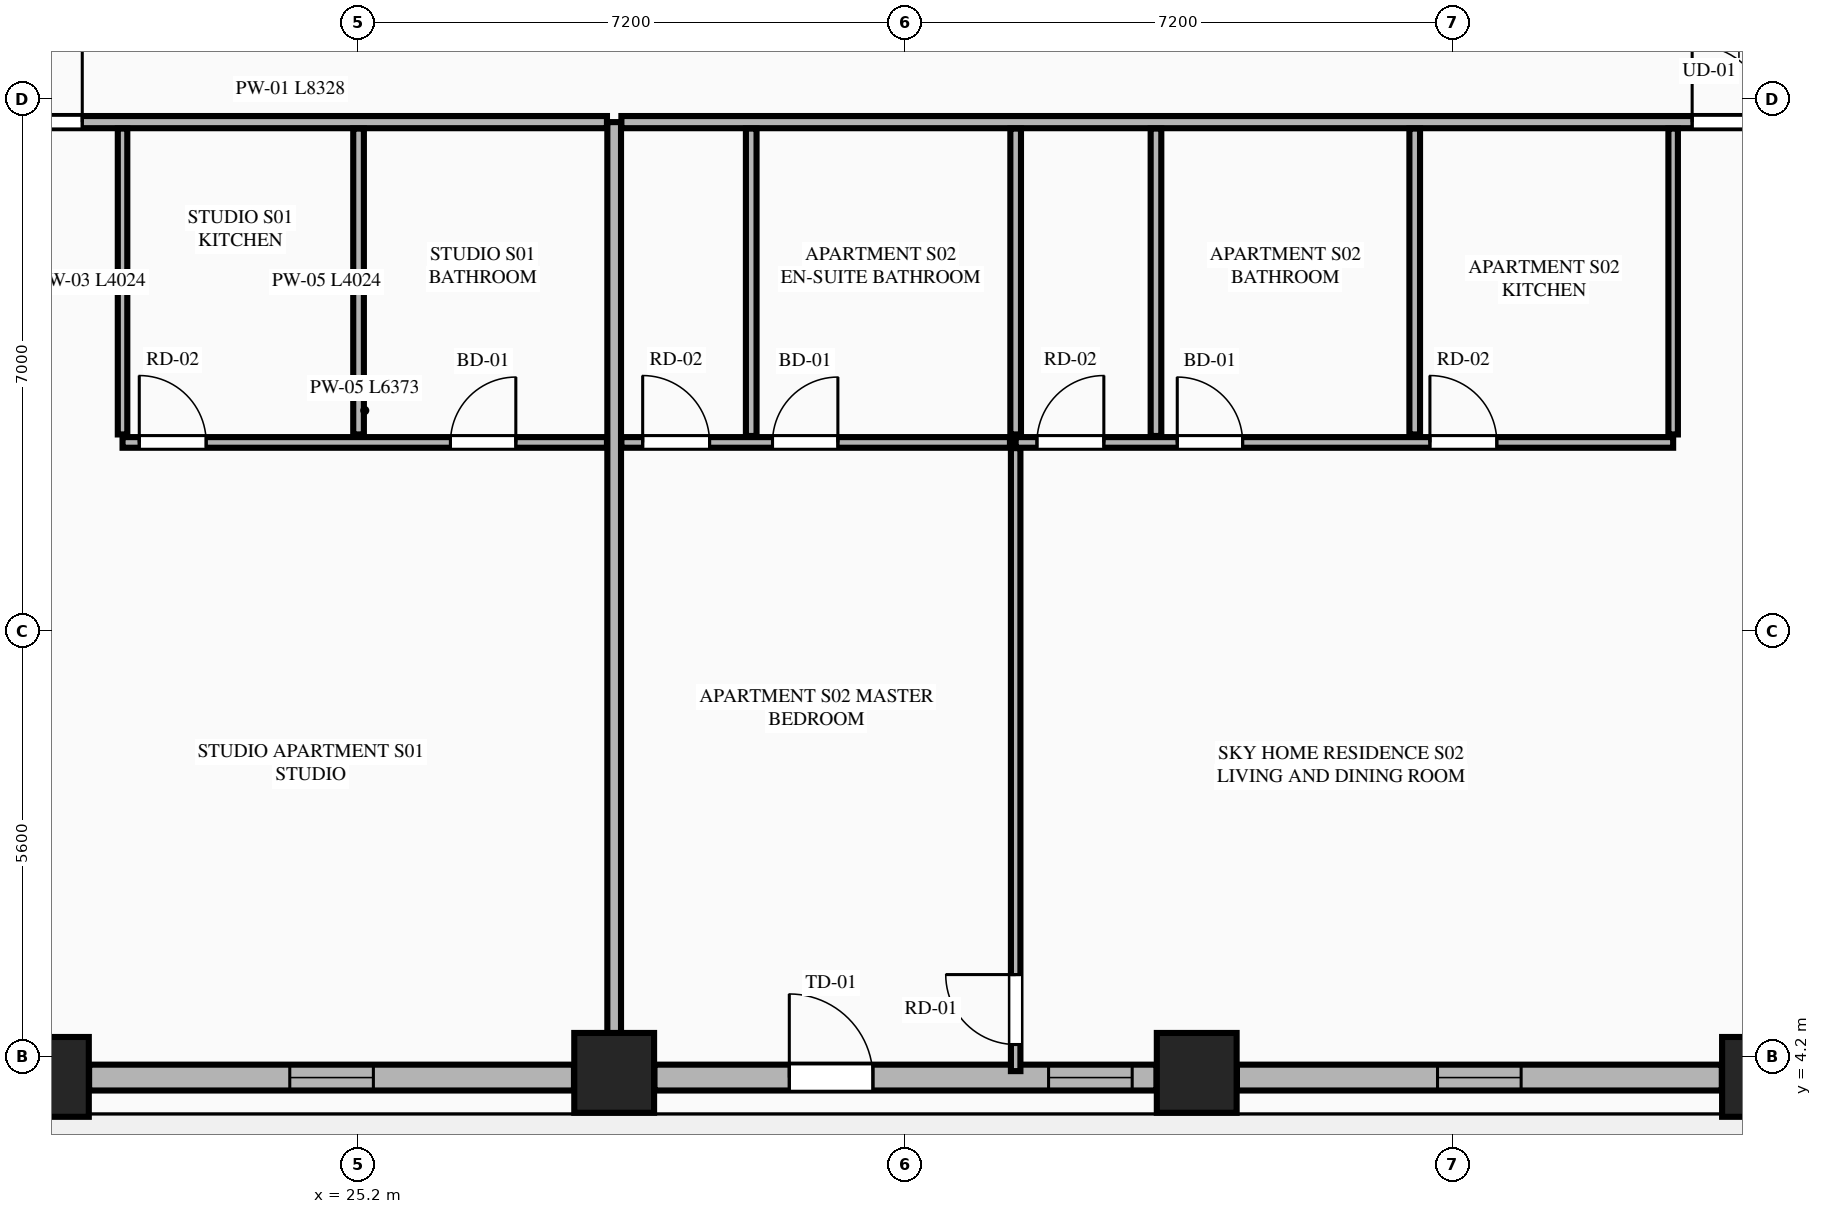
"""IFC4 building model, lengths in metres.
Left out: names, types, materials, properties, quantities, classifications, styles, units other than length and angle.
Written with IfcOpenShell. Run it as: python <this file> out.ifc"""

import sys

from ifc_helpers import new_model, si_unit, direction, frame, frame_2d, origin, origin_2d, place, context, subcontext, project, spatial, rectangle, extrude, element, fill, save


model = new_model("IFC4")
c1 = context("Model", 3, precision=1e-05, world=origin(), true_north=direction((0.0, 1.0)))
c2 = subcontext(c1, "Body", "Model", "MODEL_VIEW")
j1 = project(units=[si_unit("LENGTHUNIT", "METRE"), si_unit("PLANEANGLEUNIT", "RADIAN")], contexts=[c1])
p1 = place(None, origin())
s1 = spatial("IfcSite", under=j1, at=p1, CompositionType="ELEMENT")
p2 = place(p1, origin())
s2 = spatial("IfcBuilding", under=s1, at=p2, CompositionType="ELEMENT")
p3 = place(p2, frame((0.0, 0.0, 112.6)))
s3 = spatial("IfcBuildingStorey", under=s2, at=p3, CompositionType="ELEMENT", Elevation=112.6)
for number, where, z_axis, x_axis in (
    (1, (21.131, 3.939, 0.0), (0.0, 0.0, 1.0), (1.0, 0.0, 0.0)),
    (2, (28.568, 3.992, 0.0), (0.0, 0.0, 1.0), (1.0, 0.0, 0.0)),
    (3, (36.232, 3.992, 0.0), (0.0, 0.0, 1.0), (1.0, 0.0, 0.0)),
    (4, (43.669, 3.939, 0.0), (0.0, 0.0, 1.0), (1.0, 0.0, 0.0)),
):
    element("IfcColumn", number, at=place(p3, frame(where, z_axis=z_axis, x_axis=x_axis)), inside=s3, PredefinedType="COLUMN", context=c2, shape_type="SweptSolid", body=[
        extrude(rectangle(XDim=1.05, YDim=1.05, at=origin_2d()), origin(), (0.0, 0.0, 1.0), 3.55),
    ])
p4 = place(p3, frame((21.66, 3.93, 0.0), z_axis=(0.0, 0.0, 1.0), x_axis=(1.0, 0.0, 0.0)))
e5 = element("IfcWall", 5, at=p4, inside=s3, PredefinedType="STANDARD", context=c2, shape_type="SweptSolid", body=[
    extrude(rectangle(XDim=6.379, YDim=0.34, at=frame_2d((3.189, 0.0))), origin(), (0.0, 0.0, 1.0), 2.797),
])
p5 = place(p4, frame((2.64, 0.0, 0.75)))
e6 = element("IfcOpeningElement", 6, at=p5, cuts=e5, PredefinedType="OPENING", context=c2, shape_type="SweptSolid", body=[
    extrude(rectangle(XDim=1.1, YDim=1.897, at=frame_2d((0.55, 0.948))), frame((0.0, 0.18, 0.0), z_axis=(0.0, -1.0, 0.0), x_axis=(1.0, 0.0, 0.0)), (0.0, 0.0, 1.0), 0.36),
])
p6 = place(p3, frame((29.097, 3.93, 0.0), z_axis=(0.0, 0.0, 1.0), x_axis=(1.0, 0.0, 0.0)))
e7 = element("IfcWall", 7, at=p6, inside=s3, PredefinedType="STANDARD", context=c2, shape_type="SweptSolid", body=[
    extrude(rectangle(XDim=6.606, YDim=0.34, at=frame_2d((3.303, 0.0))), origin(), (0.0, 0.0, 1.0), 2.797),
])
p7 = place(p6, frame((1.775, 0.0, 0.0)))
e8 = element("IfcOpeningElement", 8, at=p7, cuts=e7, PredefinedType="OPENING", context=c2, shape_type="SweptSolid", body=[
    extrude(rectangle(XDim=1.1, YDim=2.25, at=frame_2d((0.55, 1.125))), frame((0.0, 0.18, 0.0), z_axis=(0.0, -1.0, 0.0), x_axis=(1.0, 0.0, 0.0)), (0.0, 0.0, 1.0), 0.36),
])
p8 = place(p6, frame((5.186, 0.0, 0.75)))
e9 = element("IfcOpeningElement", 9, at=p8, cuts=e7, PredefinedType="OPENING", context=c2, shape_type="SweptSolid", body=[
    extrude(rectangle(XDim=1.1, YDim=1.897, at=frame_2d((0.55, 0.948))), frame((0.0, 0.18, 0.0), z_axis=(0.0, -1.0, 0.0), x_axis=(1.0, 0.0, 0.0)), (0.0, 0.0, 1.0), 0.36),
])
p9 = place(p3, frame((36.761, 3.93, 0.0), z_axis=(0.0, 0.0, 1.0), x_axis=(1.0, 0.0, 0.0)))
e10 = element("IfcWall", 10, at=p9, inside=s3, PredefinedType="STANDARD", context=c2, shape_type="SweptSolid", body=[
    extrude(rectangle(XDim=6.379, YDim=0.34, at=frame_2d((3.189, 0.0))), origin(), (0.0, 0.0, 1.0), 2.797),
])
p10 = place(p9, frame((2.639, 0.0, 0.75)))
e11 = element("IfcOpeningElement", 11, at=p10, cuts=e10, PredefinedType="OPENING", context=c2, shape_type="SweptSolid", body=[
    extrude(rectangle(XDim=1.1, YDim=1.897, at=frame_2d((0.55, 0.948))), frame((0.0, 0.18, 0.0), z_axis=(0.0, -1.0, 0.0), x_axis=(1.0, 0.0, 0.0)), (0.0, 0.0, 1.0), 0.36),
])
p11 = place(p3, frame((28.568, 4.105, 0.0), z_axis=(0.0, 0.0, 1.0), x_axis=(0.0, 1.0, 0.0)))
e12 = element("IfcWall", 12, at=p11, inside=s3, PredefinedType="PARTITIONING", context=c2, shape_type="SweptSolid", body=[
    extrude(rectangle(XDim=12.395, YDim=0.18, at=frame_2d((6.198, 0.0))), origin(), (0.0, 0.0, 1.0), 2.722),
])
p12 = place(p3, frame((20.145, 16.5, 0.0), z_axis=(0.0, 0.0, 1.0), x_axis=(1.0, 0.0, 0.0)))
e13 = element("IfcWall", 13, at=p12, inside=s3, PredefinedType="PARTITIONING", context=c2, shape_type="SweptSolid", body=[
    extrude(rectangle(XDim=8.328, YDim=0.16, at=frame_2d((4.164, 0.0))), origin(), (0.0, 0.0, 1.0), 3.34),
])
p13 = place(p12, frame((0.405, 0.0, 0.0)))
e14 = element("IfcOpeningElement", 14, at=p13, cuts=e13, PredefinedType="OPENING", context=c2, shape_type="SweptSolid", body=[
    extrude(rectangle(XDim=1.02, YDim=2.25, at=frame_2d((0.51, 1.125))), frame((0.0, 0.09, 0.0), z_axis=(0.0, -1.0, 0.0), x_axis=(1.0, 0.0, 0.0)), (0.0, 0.0, 1.0), 0.18),
])
p14 = place(p3, frame((22.1, 12.391, 0.0), z_axis=(0.0, 0.0, 1.0), x_axis=(0.0, 1.0, 0.0)))
e15 = element("IfcWall", 15, at=p14, inside=s3, PredefinedType="PARTITIONING", context=c2, shape_type="SweptSolid", body=[
    extrude(rectangle(XDim=4.024, YDim=0.125, at=frame_2d((2.012, 0.0))), origin(), (0.0, 0.0, 1.0), 2.722),
])
p15 = place(p3, frame((22.1, 12.286, 0.0), z_axis=(0.0, 0.0, 1.0), x_axis=(1.0, 0.0, 0.0)))
e16 = element("IfcWall", 16, at=p15, inside=s3, PredefinedType="PLUMBINGWALL", context=c2, shape_type="SweptSolid", body=[
    extrude(rectangle(XDim=6.373, YDim=0.14, at=frame_2d((3.187, 0.0))), origin(), (0.0, 0.0, 1.0), 3.34),
])
p16 = place(p15, frame((4.314, 0.0, 0.0)))
e17 = element("IfcOpeningElement", 17, at=p16, cuts=e16, PredefinedType="OPENING", context=c2, shape_type="SweptSolid", body=[
    extrude(rectangle(XDim=0.86, YDim=2.1, at=frame_2d((0.43, 1.05))), frame((0.0, 0.08, 0.0), z_axis=(0.0, -1.0, 0.0), x_axis=(1.0, 0.0, 0.0)), (0.0, 0.0, 1.0), 0.16),
])
p17 = place(p15, frame((0.22, 0.0, 0.0)))
e18 = element("IfcOpeningElement", 18, at=p17, cuts=e16, PredefinedType="OPENING", context=c2, shape_type="SweptSolid", body=[
    extrude(rectangle(XDim=0.88, YDim=2.15, at=frame_2d((0.44, 1.075))), frame((0.0, 0.08, 0.0), z_axis=(0.0, -1.0, 0.0), x_axis=(1.0, 0.0, 0.0)), (0.0, 0.0, 1.0), 0.16),
])
p18 = place(p3, frame((25.205, 12.391, 0.0), z_axis=(0.0, 0.0, 1.0), x_axis=(0.0, 1.0, 0.0)))
e19 = element("IfcWall", 19, at=p18, inside=s3, PredefinedType="PLUMBINGWALL", context=c2, shape_type="SweptSolid", body=[
    extrude(rectangle(XDim=4.024, YDim=0.14, at=frame_2d((2.012, 0.0))), origin(), (0.0, 0.0, 1.0), 3.34),
])
p19 = place(p3, frame((28.663, 16.5, 0.0), z_axis=(0.0, 0.0, 1.0), x_axis=(1.0, 0.0, 0.0)))
e20 = element("IfcWall", 20, at=p19, inside=s3, PredefinedType="PARTITIONING", context=c2, shape_type="SweptSolid", body=[
    extrude(rectangle(XDim=15.992, YDim=0.16, at=frame_2d((7.996, 0.0))), origin(), (0.0, 0.0, 1.0), 3.34),
])
p20 = place(p19, frame((14.087, 0.0, 0.0)))
e21 = element("IfcOpeningElement", 21, at=p20, cuts=e20, PredefinedType="OPENING", context=c2, shape_type="SweptSolid", body=[
    extrude(rectangle(XDim=1.02, YDim=2.25, at=frame_2d((0.51, 1.125))), frame((0.0, 0.09, 0.0), z_axis=(0.0, -1.0, 0.0), x_axis=(1.0, 0.0, 0.0)), (0.0, 0.0, 1.0), 0.18),
])
p21 = place(p3, frame((42.5, 12.391, 0.0), z_axis=(0.0, 0.0, 1.0), x_axis=(0.0, 1.0, 0.0)))
e22 = element("IfcWall", 22, at=p21, inside=s3, PredefinedType="PARTITIONING", context=c2, shape_type="SweptSolid", body=[
    extrude(rectangle(XDim=4.024, YDim=0.125, at=frame_2d((2.012, 0.0))), origin(), (0.0, 0.0, 1.0), 2.722),
])
p22 = place(p3, frame((33.85, 12.286, 0.0), z_axis=(0.0, 0.0, 1.0), x_axis=(1.0, 0.0, 0.0)))
e23 = element("IfcWall", 23, at=p22, inside=s3, PredefinedType="PLUMBINGWALL", context=c2, shape_type="SweptSolid", body=[
    extrude(rectangle(XDim=8.65, YDim=0.14, at=frame_2d((4.325, 0.0))), origin(), (0.0, 0.0, 1.0), 3.34),
])
p23 = place(p22, frame((0.28, 0.0, 0.0)))
e24 = element("IfcOpeningElement", 24, at=p23, cuts=e23, PredefinedType="OPENING", context=c2, shape_type="SweptSolid", body=[
    extrude(rectangle(XDim=0.88, YDim=2.15, at=frame_2d((0.44, 1.075))), frame((0.0, 0.08, 0.0), z_axis=(0.0, -1.0, 0.0), x_axis=(1.0, 0.0, 0.0)), (0.0, 0.0, 1.0), 0.16),
])
p24 = place(p22, frame((2.126, 0.0, 0.0)))
e25 = element("IfcOpeningElement", 25, at=p24, cuts=e23, PredefinedType="OPENING", context=c2, shape_type="SweptSolid", body=[
    extrude(rectangle(XDim=0.86, YDim=2.1, at=frame_2d((0.43, 1.05))), frame((0.0, 0.08, 0.0), z_axis=(0.0, -1.0, 0.0), x_axis=(1.0, 0.0, 0.0)), (0.0, 0.0, 1.0), 0.16),
])
p25 = place(p22, frame((5.45, 0.0, 0.0)))
e26 = element("IfcOpeningElement", 26, at=p25, cuts=e23, PredefinedType="OPENING", context=c2, shape_type="SweptSolid", body=[
    extrude(rectangle(XDim=0.88, YDim=2.15, at=frame_2d((0.44, 1.075))), frame((0.0, 0.08, 0.0), z_axis=(0.0, -1.0, 0.0), x_axis=(1.0, 0.0, 0.0)), (0.0, 0.0, 1.0), 0.16),
])
p26 = place(p3, frame((28.663, 12.286, 0.0), z_axis=(0.0, 0.0, 1.0), x_axis=(1.0, 0.0, 0.0)))
e27 = element("IfcWall", 27, at=p26, inside=s3, PredefinedType="PLUMBINGWALL", context=c2, shape_type="SweptSolid", body=[
    extrude(rectangle(XDim=5.112, YDim=0.14, at=frame_2d((2.556, 0.0))), origin(), (0.0, 0.0, 1.0), 3.34),
])
p27 = place(p26, frame((0.28, 0.0, 0.0)))
e28 = element("IfcOpeningElement", 28, at=p27, cuts=e27, PredefinedType="OPENING", context=c2, shape_type="SweptSolid", body=[
    extrude(rectangle(XDim=0.88, YDim=2.15, at=frame_2d((0.44, 1.075))), frame((0.0, 0.08, 0.0), z_axis=(0.0, -1.0, 0.0), x_axis=(1.0, 0.0, 0.0)), (0.0, 0.0, 1.0), 0.16),
])
p28 = place(p26, frame((1.988, 0.0, 0.0)))
e29 = element("IfcOpeningElement", 29, at=p28, cuts=e27, PredefinedType="OPENING", context=c2, shape_type="SweptSolid", body=[
    extrude(rectangle(XDim=0.86, YDim=2.1, at=frame_2d((0.43, 1.05))), frame((0.0, 0.08, 0.0), z_axis=(0.0, -1.0, 0.0), x_axis=(1.0, 0.0, 0.0)), (0.0, 0.0, 1.0), 0.16),
])
for number, where, z_axis, x_axis in (
    (30, (39.1, 12.391, 0.0), (0.0, 0.0, 1.0), (0.0, 1.0, 0.0)),
    (31, (33.85, 12.391, 0.0), (0.0, 0.0, 1.0), (0.0, 1.0, 0.0)),
):
    element("IfcWall", number, at=place(p3, frame(where, z_axis=z_axis, x_axis=x_axis)), inside=s3, PredefinedType="PLUMBINGWALL", context=c2, shape_type="SweptSolid", body=[
        extrude(rectangle(XDim=4.024, YDim=0.14, at=frame_2d((2.012, 0.0))), origin(), (0.0, 0.0, 1.0), 3.34),
    ])
p29 = place(p3, frame((33.85, 4.015, 0.0), z_axis=(0.0, 0.0, 1.0), x_axis=(0.0, 1.0, 0.0)))
e32 = element("IfcWall", 32, at=p29, inside=s3, PredefinedType="PARTITIONING", context=c2, shape_type="SweptSolid", body=[
    extrude(rectangle(XDim=8.196, YDim=0.125, at=frame_2d((4.098, 0.0))), origin(), (0.0, 0.0, 1.0), 3.34),
])
p30 = place(p29, frame((0.35, 0.0, 0.0)))
e33 = element("IfcOpeningElement", 33, at=p30, cuts=e32, PredefinedType="OPENING", context=c2, shape_type="SweptSolid", body=[
    extrude(rectangle(XDim=0.92, YDim=2.15, at=frame_2d((0.46, 1.075))), frame((0.0, 0.073, 0.0), z_axis=(0.0, -1.0, 0.0), x_axis=(1.0, 0.0, 0.0)), (0.0, 0.0, 1.0), 0.145),
])
for number, where, z_axis, x_axis in (
    (34, (35.696, 12.371, 0.0), (0.0, 0.0, 1.0), (0.0, 1.0, 0.0)),
    (35, (30.371, 12.371, 0.0), (0.0, 0.0, 1.0), (0.0, 1.0, 0.0)),
):
    element("IfcWall", number, at=place(p3, frame(where, z_axis=z_axis, x_axis=x_axis)), inside=s3, PredefinedType="PLUMBINGWALL", context=c2, shape_type="SweptSolid", body=[
        extrude(rectangle(XDim=4.044, YDim=0.14, at=frame_2d((2.022, 0.0))), origin(), (0.0, 0.0, 1.0), 3.34),
    ])
p31 = place(p5, origin())
e36 = element("IfcWindow", 36, at=p31, inside=s3, PartitioningType="SINGLE_PANEL", PredefinedType="WINDOW", context=c2, shape_type="SweptSolid", body=[
    extrude(rectangle(XDim=1.1, YDim=1.897, at=frame_2d((0.55, 0.948))), frame((0.0, 0.03, 0.0), z_axis=(0.0, -1.0, 0.0), x_axis=(1.0, 0.0, 0.0)), (0.0, 0.0, 1.0), 0.06),
])
fill(e6, e36)
p32 = place(p7, origin())
e37 = element("IfcDoor", 37, at=p32, inside=s3, OperationType="SINGLE_SWING_LEFT", PredefinedType="DOOR", context=c2, shape_type="SweptSolid", body=[
    extrude(rectangle(XDim=1.1, YDim=2.25, at=frame_2d((0.55, 1.125))), frame((0.0, 0.025, 0.0), z_axis=(0.0, -1.0, 0.0), x_axis=(1.0, 0.0, 0.0)), (0.0, 0.0, 1.0), 0.05),
])
fill(e8, e37)
p33 = place(p10, origin())
e38 = element("IfcWindow", 38, at=p33, inside=s3, PartitioningType="SINGLE_PANEL", PredefinedType="WINDOW", context=c2, shape_type="SweptSolid", body=[
    extrude(rectangle(XDim=1.1, YDim=1.897, at=frame_2d((0.55, 0.948))), frame((0.0, 0.03, 0.0), z_axis=(0.0, -1.0, 0.0), x_axis=(1.0, 0.0, 0.0)), (0.0, 0.0, 1.0), 0.06),
])
fill(e11, e38)
p34 = place(p16, origin())
e39 = element("IfcDoor", 39, at=p34, inside=s3, OperationType="SINGLE_SWING_RIGHT", PredefinedType="DOOR", context=c2, shape_type="SweptSolid", body=[
    extrude(rectangle(XDim=0.86, YDim=2.1, at=frame_2d((0.43, 1.05))), frame((0.0, 0.025, 0.0), z_axis=(0.0, -1.0, 0.0), x_axis=(1.0, 0.0, 0.0)), (0.0, 0.0, 1.0), 0.05),
])
fill(e17, e39)
p35 = place(p13, origin())
e40 = element("IfcDoor", 40, at=p35, inside=s3, OperationType="SINGLE_SWING_RIGHT", PredefinedType="DOOR", context=c2, shape_type="SweptSolid", body=[
    extrude(rectangle(XDim=1.02, YDim=2.25, at=frame_2d((0.51, 1.125))), frame((0.0, 0.025, 0.0), z_axis=(0.0, -1.0, 0.0), x_axis=(1.0, 0.0, 0.0)), (0.0, 0.0, 1.0), 0.05),
])
fill(e14, e40)
p36 = place(p17, origin())
e41 = element("IfcDoor", 41, at=p36, inside=s3, OperationType="SINGLE_SWING_LEFT", PredefinedType="DOOR", context=c2, shape_type="SweptSolid", body=[
    extrude(rectangle(XDim=0.88, YDim=2.15, at=frame_2d((0.44, 1.075))), frame((0.0, 0.025, 0.0), z_axis=(0.0, -1.0, 0.0), x_axis=(1.0, 0.0, 0.0)), (0.0, 0.0, 1.0), 0.05),
])
fill(e18, e41)
p37 = place(p23, origin())
e42 = element("IfcDoor", 42, at=p37, inside=s3, OperationType="SINGLE_SWING_RIGHT", PredefinedType="DOOR", context=c2, shape_type="SweptSolid", body=[
    extrude(rectangle(XDim=0.88, YDim=2.15, at=frame_2d((0.44, 1.075))), frame((0.0, 0.025, 0.0), z_axis=(0.0, -1.0, 0.0), x_axis=(1.0, 0.0, 0.0)), (0.0, 0.0, 1.0), 0.05),
])
fill(e24, e42)
p38 = place(p24, origin())
e43 = element("IfcDoor", 43, at=p38, inside=s3, OperationType="SINGLE_SWING_LEFT", PredefinedType="DOOR", context=c2, shape_type="SweptSolid", body=[
    extrude(rectangle(XDim=0.86, YDim=2.1, at=frame_2d((0.43, 1.05))), frame((0.0, 0.025, 0.0), z_axis=(0.0, -1.0, 0.0), x_axis=(1.0, 0.0, 0.0)), (0.0, 0.0, 1.0), 0.05),
])
fill(e25, e43)
p39 = place(p27, origin())
e44 = element("IfcDoor", 44, at=p39, inside=s3, OperationType="SINGLE_SWING_LEFT", PredefinedType="DOOR", context=c2, shape_type="SweptSolid", body=[
    extrude(rectangle(XDim=0.88, YDim=2.15, at=frame_2d((0.44, 1.075))), frame((0.0, 0.025, 0.0), z_axis=(0.0, -1.0, 0.0), x_axis=(1.0, 0.0, 0.0)), (0.0, 0.0, 1.0), 0.05),
])
fill(e28, e44)
p40 = place(p28, origin())
e45 = element("IfcDoor", 45, at=p40, inside=s3, OperationType="SINGLE_SWING_RIGHT", PredefinedType="DOOR", context=c2, shape_type="SweptSolid", body=[
    extrude(rectangle(XDim=0.86, YDim=2.1, at=frame_2d((0.43, 1.05))), frame((0.0, 0.025, 0.0), z_axis=(0.0, -1.0, 0.0), x_axis=(1.0, 0.0, 0.0)), (0.0, 0.0, 1.0), 0.05),
])
fill(e29, e45)
p41 = place(p20, origin())
e46 = element("IfcDoor", 46, at=p41, inside=s3, OperationType="SINGLE_SWING_LEFT", PredefinedType="DOOR", context=c2, shape_type="SweptSolid", body=[
    extrude(rectangle(XDim=1.02, YDim=2.25, at=frame_2d((0.51, 1.125))), frame((0.0, 0.025, 0.0), z_axis=(0.0, -1.0, 0.0), x_axis=(1.0, 0.0, 0.0)), (0.0, 0.0, 1.0), 0.05),
])
fill(e21, e46)
p42 = place(p25, origin())
e47 = element("IfcDoor", 47, at=p42, inside=s3, OperationType="SINGLE_SWING_LEFT", PredefinedType="DOOR", context=c2, shape_type="SweptSolid", body=[
    extrude(rectangle(XDim=0.88, YDim=2.15, at=frame_2d((0.44, 1.075))), frame((0.0, 0.025, 0.0), z_axis=(0.0, -1.0, 0.0), x_axis=(1.0, 0.0, 0.0)), (0.0, 0.0, 1.0), 0.05),
])
fill(e26, e47)
p43 = place(p30, origin())
e48 = element("IfcDoor", 48, at=p43, inside=s3, OperationType="SINGLE_SWING_RIGHT", PredefinedType="DOOR", context=c2, shape_type="SweptSolid", body=[
    extrude(rectangle(XDim=0.92, YDim=2.15, at=frame_2d((0.46, 1.075))), frame((0.0, 0.025, 0.0), z_axis=(0.0, -1.0, 0.0), x_axis=(1.0, 0.0, 0.0)), (0.0, 0.0, 1.0), 0.05),
])
fill(e33, e48)
p44 = place(p8, origin())
e49 = element("IfcWindow", 49, at=p44, inside=s3, PartitioningType="SINGLE_PANEL", PredefinedType="WINDOW", context=c2, shape_type="SweptSolid", body=[
    extrude(rectangle(XDim=1.1, YDim=1.897, at=frame_2d((0.55, 0.948))), frame((0.0, 0.03, 0.0), z_axis=(0.0, -1.0, 0.0), x_axis=(1.0, 0.0, 0.0)), (0.0, 0.0, 1.0), 0.06),
])
fill(e9, e49)
save(model, sys.argv[1])
